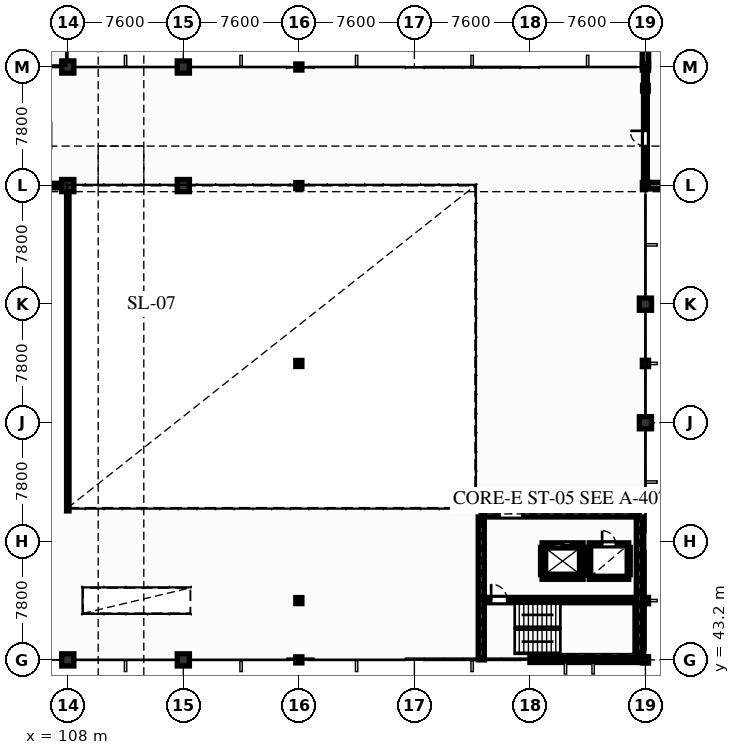
"""IFC4 building model, lengths in metres.
Left out: names, types, materials, properties, quantities, classifications, styles, units other than length and angle.
Written with IfcOpenShell. Run it as: python <this file> out.ifc"""

import sys

from ifc_helpers import new_model, si_unit, direction, frame, frame_2d, origin, origin_2d, place, context, subcontext, project, spatial, polyline, rectangle, i_section, outline, extrude, element, fill, save


model = new_model("IFC4")
c1 = context("Model", 3, precision=1e-05, world=origin(), true_north=direction((0.0, 1.0)))
c2 = subcontext(c1, "Body", "Model", "MODEL_VIEW")
j1 = project(units=[si_unit("LENGTHUNIT", "METRE"), si_unit("PLANEANGLEUNIT", "RADIAN")], contexts=[c1])
p1 = place(None, origin())
s1 = spatial("IfcSite", under=j1, at=p1, CompositionType="ELEMENT")
p2 = place(p1, origin())
s2 = spatial("IfcBuilding", under=s1, at=p2, CompositionType="ELEMENT")
p3 = place(p2, frame((0.0, 0.0, 8.94)))
s3 = spatial("IfcBuildingStorey", under=s2, at=p3, CompositionType="ELEMENT", Elevation=8.94)
for number, where, z_axis, x_axis in (
    (1, (108.0, 43.2, 0.0), (0.0, 0.0, 1.0), (1.0, 0.0, 0.0)),
    (2, (108.0, 74.4, 0.0), (0.0, 0.0, 1.0), (1.0, 0.0, 0.0)),
    (3, (108.0, 82.2, 0.0), (0.0, 0.0, 1.0), (1.0, 0.0, 0.0)),
    (4, (115.6, 43.2, 0.0), (0.0, 0.0, 1.0), (1.0, 0.0, 0.0)),
    (5, (115.6, 74.4, 0.0), (0.0, 0.0, 1.0), (1.0, 0.0, 0.0)),
    (6, (115.6, 82.2, 0.0), (0.0, 0.0, 1.0), (1.0, 0.0, 0.0)),
):
    element("IfcColumn", number, at=place(p3, frame(where, z_axis=z_axis, x_axis=x_axis)), inside=s3, PredefinedType="COLUMN", context=c2, shape_type="SweptSolid", body=[
        extrude(rectangle(XDim=0.8, YDim=0.8, at=origin_2d()), origin(), (0.0, 0.0, 1.0), 3.84),
    ])
for number, where, z_axis, x_axis in (
    (7, (123.2, 43.2, 0.0), (0.0, 0.0, 1.0), (1.0, 0.0, 0.0)),
    (8, (123.2, 74.4, 0.0), (0.0, 0.0, 1.0), (1.0, 0.0, 0.0)),
    (9, (123.2, 82.2, 0.0), (0.0, 0.0, 1.0), (1.0, 0.0, 0.0)),
):
    element("IfcColumn", number, at=place(p3, frame(where, z_axis=z_axis, x_axis=x_axis)), inside=s3, PredefinedType="COLUMN", context=c2, shape_type="SweptSolid", body=[
        extrude(i_section(OverallWidth=0.401, OverallDepth=0.399, WebThickness=0.025, FlangeThickness=0.04, at=origin_2d()), origin(), (0.0, 0.0, 1.0), 3.84),
    ])
for number, where, z_axis, x_axis in (
    (10, (146.0, 58.8, 0.0), (0.0, 0.0, 1.0), (1.0, 0.0, 0.0)),
    (11, (146.0, 66.6, 0.0), (0.0, 0.0, 1.0), (1.0, 0.0, 0.0)),
):
    element("IfcColumn", number, at=place(p3, frame(where, z_axis=z_axis, x_axis=x_axis)), inside=s3, PredefinedType="COLUMN", context=c2, shape_type="SweptSolid", body=[
        extrude(rectangle(XDim=0.8, YDim=0.8, at=origin_2d()), origin(), (0.0, 0.0, 1.0), 3.84),
    ])
for number, where, z_axis, x_axis in (
    (12, (146.0, 74.4, 0.0), (0.0, 0.0, 1.0), (1.0, 0.0, 0.0)),
    (13, (146.0, 82.2, 0.0), (0.0, 0.0, 1.0), (1.0, 0.0, 0.0)),
):
    element("IfcColumn", number, at=place(p3, frame(where, z_axis=z_axis, x_axis=x_axis)), inside=s3, PredefinedType="COLUMN", context=c2, shape_type="SweptSolid", body=[
        extrude(i_section(OverallWidth=0.406, OverallDepth=0.417, WebThickness=0.03, FlangeThickness=0.048, at=origin_2d()), origin(), (0.0, 0.0, 1.0), 3.84),
    ])
p4 = place(p3, frame((123.2, 47.1, 0.0), z_axis=(0.0, 0.0, 1.0), x_axis=(1.0, 0.0, 0.0)))
e14 = element("IfcColumn", 14, at=p4, inside=s3, PredefinedType="COLUMN", context=c2, shape_type="SweptSolid", body=[
    extrude(i_section(OverallWidth=0.401, OverallDepth=0.399, WebThickness=0.025, FlangeThickness=0.04, at=origin_2d()), origin(), (0.0, 0.0, 1.0), 3.84),
])
p5 = place(p3, frame((146.0, 47.1, 0.0), z_axis=(0.0, 0.0, 1.0), x_axis=(1.0, 0.0, 0.0)))
e15 = element("IfcColumn", 15, at=p5, inside=s3, PredefinedType="COLUMN", context=c2, shape_type="SweptSolid", body=[
    extrude(i_section(OverallWidth=0.406, OverallDepth=0.417, WebThickness=0.03, FlangeThickness=0.048, at=origin_2d()), origin(), (0.0, 0.0, 1.0), 3.84),
])
p6 = place(p3, frame((123.2, 62.7, 0.0), z_axis=(0.0, 0.0, 1.0), x_axis=(1.0, 0.0, 0.0)))
e16 = element("IfcColumn", 16, at=p6, inside=s3, PredefinedType="COLUMN", context=c2, shape_type="SweptSolid", body=[
    extrude(i_section(OverallWidth=0.401, OverallDepth=0.399, WebThickness=0.025, FlangeThickness=0.04, at=origin_2d()), origin(), (0.0, 0.0, 1.0), 3.84),
])
for number, where, z_axis, x_axis in (
    (17, (146.0, 62.7, 0.0), (0.0, 0.0, 1.0), (1.0, 0.0, 0.0)),
    (18, (146.0, 43.2, 0.0), (0.0, 0.0, 1.0), (1.0, 0.0, 0.0)),
):
    element("IfcColumn", number, at=place(p3, frame(where, z_axis=z_axis, x_axis=x_axis)), inside=s3, PredefinedType="COLUMN", context=c2, shape_type="SweptSolid", body=[
        extrude(i_section(OverallWidth=0.406, OverallDepth=0.417, WebThickness=0.03, FlangeThickness=0.048, at=origin_2d()), origin(), (0.0, 0.0, 1.0), 3.84),
    ])
p7 = place(p3, frame((146.0, 80.8, 0.0), z_axis=(0.0, 0.0, 1.0), x_axis=(1.0, 0.0, 0.0)))
e19 = element("IfcColumn", 19, at=p7, inside=s3, PredefinedType="COLUMN", context=c2, shape_type="SweptSolid", body=[
    extrude(i_section(OverallWidth=0.373, OverallDepth=0.368, WebThickness=0.015, FlangeThickness=0.024, at=origin_2d()), origin(), (0.0, 0.0, 1.0), 3.84),
])
p8 = place(p3, frame((90.0, 74.4, 0.0), z_axis=(0.0, 0.0, 1.0), x_axis=(1.0, 0.0, 0.0)))
e20 = element("IfcWall", 20, at=p8, inside=s3, PredefinedType="SOLIDWALL", context=c2, shape_type="SweptSolid", body=[
    extrude(rectangle(XDim=18.0, YDim=0.3, at=frame_2d((9.0, 0.0))), origin(), (0.0, 0.0, 1.0), 4.65),
])
p9 = place(p8, frame((3.0, 0.0, 3.23)))
e21 = element("IfcOpeningElement", 21, at=p9, cuts=e20, PredefinedType="OPENING", context=c2, shape_type="SweptSolid", body=[
    extrude(rectangle(XDim=2.6, YDim=1.3, at=frame_2d((1.3, 0.65))), frame((0.0, 0.16, 0.0), z_axis=(0.0, -1.0, 0.0), x_axis=(1.0, 0.0, 0.0)), (0.0, 0.0, 1.0), 0.32),
])
p10 = place(p8, frame((11.0, 0.0, 3.23)))
e22 = element("IfcOpeningElement", 22, at=p10, cuts=e20, PredefinedType="OPENING", context=c2, shape_type="SweptSolid", body=[
    extrude(rectangle(XDim=2.6, YDim=1.3, at=frame_2d((1.3, 0.65))), frame((0.0, 0.16, 0.0), z_axis=(0.0, -1.0, 0.0), x_axis=(1.0, 0.0, 0.0)), (0.0, 0.0, 1.0), 0.32),
])
p11 = place(p3, frame((138.4, 43.2, 0.0), z_axis=(0.0, 0.0, 1.0), x_axis=(1.0, 0.0, 0.0)))
e23 = element("IfcWall", 23, at=p11, inside=s3, PredefinedType="SOLIDWALL", context=c2, shape_type="SweptSolid", body=[
    extrude(rectangle(XDim=7.6, YDim=0.34, at=frame_2d((3.8, 0.0))), origin(), (0.0, 0.0, 1.0), 3.53),
])
p12 = place(p11, frame((2.5, 0.0, 0.9)))
e24 = element("IfcOpeningElement", 24, at=p12, cuts=e23, PredefinedType="OPENING", context=c2, shape_type="SweptSolid", body=[
    extrude(rectangle(XDim=1.5, YDim=2.1, at=frame_2d((0.75, 1.05))), frame((0.0, 0.18, 0.0), z_axis=(0.0, -1.0, 0.0), x_axis=(1.0, 0.0, 0.0)), (0.0, 0.0, 1.0), 0.36),
])
p13 = place(p3, frame((146.0, 74.4, 0.0), z_axis=(0.0, 0.0, 1.0), x_axis=(1.0, 0.0, 0.0)))
e25 = element("IfcWall", 25, at=p13, inside=s3, PredefinedType="SOLIDWALL", context=c2, shape_type="SweptSolid", body=[
    extrude(outline(polyline([(0.0, 0.0), (22.0, 0.0), (22.0, 3.94), (0.0, 9.24), (0.0, 0.0)])), frame((0.0, 0.21, 0.0), z_axis=(0.0, -1.0, 0.0), x_axis=(1.0, 0.0, 0.0)), (0.0, 0.0, 1.0), 0.42),
])
p14 = place(p13, frame((3.0, 0.0, 0.95)))
e26 = element("IfcOpeningElement", 26, at=p14, cuts=e25, PredefinedType="OPENING", context=c2, shape_type="SweptSolid", body=[
    extrude(rectangle(XDim=2.5, YDim=2.0, at=frame_2d((1.25, 1.0))), frame((0.0, 0.22, 0.0), z_axis=(0.0, -1.0, 0.0), x_axis=(1.0, 0.0, 0.0)), (0.0, 0.0, 1.0), 0.44),
])
p15 = place(p13, frame((10.5, 0.0, 0.95)))
e27 = element("IfcOpeningElement", 27, at=p15, cuts=e25, PredefinedType="OPENING", context=c2, shape_type="SweptSolid", body=[
    extrude(rectangle(XDim=2.05, YDim=1.85, at=frame_2d((1.025, 0.925))), frame((0.0, 0.22, 0.0), z_axis=(0.0, -1.0, 0.0), x_axis=(1.0, 0.0, 0.0)), (0.0, 0.0, 1.0), 0.44),
])
p16 = place(p3, frame((146.0, 82.2, 0.0), z_axis=(0.0, 0.0, 1.0), x_axis=(0.0, 1.0, 0.0)))
e28 = element("IfcWall", 28, at=p16, inside=s3, PredefinedType="SOLIDWALL", context=c2, shape_type="SweptSolid", body=[
    extrude(rectangle(XDim=23.8, YDim=0.42, at=frame_2d((11.9, 0.0))), origin(), (0.0, 0.0, 1.0), 9.24),
])
p17 = place(p3, frame((135.2, 52.8, 0.0), z_axis=(0.0, 0.0, 1.0), x_axis=(1.0, 0.0, 0.0)))
e29 = element("IfcWall", 29, at=p17, inside=s3, PredefinedType="SHEAR", context=c2, shape_type="SweptSolid", body=[
    extrude(rectangle(XDim=10.4, YDim=0.4, at=frame_2d((5.2, 0.0))), origin(), (0.0, 0.0, 1.0), 3.53),
])
p18 = place(p17, frame((1.2, 0.0, 0.0)))
e30 = element("IfcOpeningElement", 30, at=p18, cuts=e29, PredefinedType="OPENING", context=c2, shape_type="SweptSolid", body=[
    extrude(rectangle(XDim=1.5, YDim=2.2, at=frame_2d((0.75, 1.1))), frame((0.0, 0.21, 0.0), z_axis=(0.0, -1.0, 0.0), x_axis=(1.0, 0.0, 0.0)), (0.0, 0.0, 1.0), 0.42),
])
for number, where, z_axis, x_axis in (
    (31, (135.2, 43.2, 0.0), (0.0, 0.0, 1.0), (0.0, 1.0, 0.0)),
    (32, (145.6, 43.2, 0.0), (0.0, 0.0, 1.0), (0.0, 1.0, 0.0)),
):
    element("IfcWall", number, at=place(p3, frame(where, z_axis=z_axis, x_axis=x_axis)), inside=s3, PredefinedType="SHEAR", context=c2, shape_type="SweptSolid", body=[
        extrude(rectangle(XDim=9.4, YDim=0.4, at=frame_2d((4.7, 0.0))), origin(), (0.0, 0.0, 1.0), 3.53),
    ])
p19 = place(p3, frame((135.4, 47.135, 0.0), z_axis=(0.0, 0.0, 1.0), x_axis=(1.0, 0.0, 0.0)))
e33 = element("IfcWall", 33, at=p19, inside=s3, PredefinedType="SHEAR", context=c2, shape_type="SweptSolid", body=[
    extrude(rectangle(XDim=10.0, YDim=0.35, at=frame_2d((5.0, 0.0))), origin(), (0.0, 0.0, 1.0), 3.53),
])
p20 = place(p19, frame((0.45, 0.0, 0.0)))
e34 = element("IfcOpeningElement", 34, at=p20, cuts=e33, PredefinedType="OPENING", context=c2, shape_type="SweptSolid", body=[
    extrude(rectangle(XDim=1.05, YDim=2.2, at=frame_2d((0.525, 1.1))), frame((0.0, 0.185, 0.0), z_axis=(0.0, -1.0, 0.0), x_axis=(1.0, 0.0, 0.0)), (0.0, 0.0, 1.0), 0.37),
])
p21 = place(p3, frame((139.2, 48.6, 0.0), z_axis=(0.0, 0.0, 1.0), x_axis=(1.0, 0.0, 0.0)))
e35 = element("IfcWall", 35, at=p21, inside=s3, PredefinedType="PARTITIONING", context=c2, shape_type="SweptSolid", body=[
    extrude(rectangle(XDim=2.7, YDim=0.2, at=frame_2d((1.35, 0.0))), origin(), (0.0, 0.0, 1.0), 3.53),
])
p22 = place(p3, frame((139.2, 50.8, 0.0), z_axis=(0.0, 0.0, 1.0), x_axis=(1.0, 0.0, 0.0)))
e36 = element("IfcWall", 36, at=p22, inside=s3, PredefinedType="PARTITIONING", context=c2, shape_type="SweptSolid", body=[
    extrude(rectangle(XDim=2.7, YDim=0.2, at=frame_2d((1.35, 0.0))), origin(), (0.0, 0.0, 1.0), 3.53),
])
p23 = place(p22, frame((0.8, 0.0, 0.0)))
e37 = element("IfcOpeningElement", 37, at=p23, cuts=e36, PredefinedType="OPENING", context=c2, shape_type="SweptSolid", body=[
    extrude(rectangle(XDim=1.1, YDim=2.15, at=frame_2d((0.55, 1.075))), frame((0.0, 0.11, 0.0), z_axis=(0.0, -1.0, 0.0), x_axis=(1.0, 0.0, 0.0)), (0.0, 0.0, 1.0), 0.22),
])
for number, where, z_axis, x_axis in (
    (38, (139.2, 48.8, 0.0), (0.0, 0.0, 1.0), (0.0, 1.0, 0.0)),
    (39, (141.9, 48.8, 0.0), (0.0, 0.0, 1.0), (0.0, 1.0, 0.0)),
):
    element("IfcWall", number, at=place(p3, frame(where, z_axis=z_axis, x_axis=x_axis)), inside=s3, PredefinedType="PARTITIONING", context=c2, shape_type="SweptSolid", body=[
        extrude(rectangle(XDim=1.8, YDim=0.2, at=frame_2d((0.9, 0.0))), origin(), (0.0, 0.0, 1.0), 3.53),
    ])
p24 = place(p3, frame((142.3, 48.6, 0.0), z_axis=(0.0, 0.0, 1.0), x_axis=(1.0, 0.0, 0.0)))
e40 = element("IfcWall", 40, at=p24, inside=s3, PredefinedType="PARTITIONING", context=c2, shape_type="SweptSolid", body=[
    extrude(rectangle(XDim=2.6, YDim=0.2, at=frame_2d((1.3, 0.0))), origin(), (0.0, 0.0, 1.0), 3.53),
])
p25 = place(p3, frame((142.3, 50.8, 0.0), z_axis=(0.0, 0.0, 1.0), x_axis=(1.0, 0.0, 0.0)))
e41 = element("IfcWall", 41, at=p25, inside=s3, PredefinedType="PARTITIONING", context=c2, shape_type="SweptSolid", body=[
    extrude(rectangle(XDim=2.6, YDim=0.2, at=frame_2d((1.3, 0.0))), origin(), (0.0, 0.0, 1.0), 3.53),
])
p26 = place(p25, frame((0.85, 0.0, 0.0)))
e42 = element("IfcOpeningElement", 42, at=p26, cuts=e41, PredefinedType="OPENING", context=c2, shape_type="SweptSolid", body=[
    extrude(rectangle(XDim=0.9, YDim=2.1, at=frame_2d((0.45, 1.05))), frame((0.0, 0.11, 0.0), z_axis=(0.0, -1.0, 0.0), x_axis=(1.0, 0.0, 0.0)), (0.0, 0.0, 1.0), 0.22),
])
for number, where, z_axis, x_axis in (
    (43, (142.3, 48.8, 0.0), (0.0, 0.0, 1.0), (0.0, 1.0, 0.0)),
    (44, (144.9, 48.8, 0.0), (0.0, 0.0, 1.0), (0.0, 1.0, 0.0)),
):
    element("IfcWall", number, at=place(p3, frame(where, z_axis=z_axis, x_axis=x_axis)), inside=s3, PredefinedType="PARTITIONING", context=c2, shape_type="SweptSolid", body=[
        extrude(rectangle(XDim=1.8, YDim=0.2, at=frame_2d((0.9, 0.0))), origin(), (0.0, 0.0, 1.0), 3.53),
    ])
p27 = place(p3, frame((146.0, 74.4, 0.0), z_axis=(0.0, 0.0, 1.0), x_axis=(0.0, 1.0, 0.0)))
e45 = element("IfcWall", 45, at=p27, inside=s3, PredefinedType="PARTITIONING", context=c2, shape_type="SweptSolid", body=[
    extrude(rectangle(XDim=7.8, YDim=0.25, at=frame_2d((3.9, 0.0))), origin(), (0.0, 0.0, 1.0), 3.058),
])
p28 = place(p27, frame((2.6, 0.0, 0.0)))
e46 = element("IfcOpeningElement", 46, at=p28, cuts=e45, PredefinedType="OPENING", context=c2, shape_type="SweptSolid", body=[
    extrude(rectangle(XDim=1.0, YDim=2.15, at=frame_2d((0.5, 1.075))), frame((0.0, 0.135, 0.0), z_axis=(0.0, -1.0, 0.0), x_axis=(1.0, 0.0, 0.0)), (0.0, 0.0, 1.0), 0.27),
])
p29 = place(p3, frame((108.0, 53.0, 0.0), z_axis=(0.0, 0.0, 1.0), x_axis=(0.0, 1.0, 0.0)))
e47 = element("IfcWall", 47, at=p29, inside=s3, PredefinedType="PARTITIONING", context=c2, shape_type="SweptSolid", body=[
    extrude(rectangle(XDim=21.4, YDim=0.16, at=frame_2d((10.7, 0.0))), origin(), (0.0, 0.0, 1.0), 3.53),
])
p30 = place(p12, origin())
e48 = element("IfcWindow", 48, at=p30, inside=s3, PartitioningType="SINGLE_PANEL", PredefinedType="WINDOW", context=c2, shape_type="SweptSolid", body=[
    extrude(rectangle(XDim=1.5, YDim=2.1, at=frame_2d((0.75, 1.05))), frame((0.0, 0.03, 0.0), z_axis=(0.0, -1.0, 0.0), x_axis=(1.0, 0.0, 0.0)), (0.0, 0.0, 1.0), 0.06),
])
fill(e24, e48)
p31 = place(p18, origin())
e49 = element("IfcDoor", 49, at=p31, inside=s3, OperationType="DOUBLE_DOOR_SINGLE_SWING", PredefinedType="DOOR", context=c2, shape_type="SweptSolid", body=[
    extrude(rectangle(XDim=1.5, YDim=2.2, at=frame_2d((0.75, 1.1))), frame((0.0, 0.025, 0.0), z_axis=(0.0, -1.0, 0.0), x_axis=(1.0, 0.0, 0.0)), (0.0, 0.0, 1.0), 0.05),
])
fill(e30, e49)
p32 = place(p20, origin())
e50 = element("IfcDoor", 50, at=p32, inside=s3, OperationType="SINGLE_SWING_LEFT", PredefinedType="DOOR", context=c2, shape_type="SweptSolid", body=[
    extrude(rectangle(XDim=1.05, YDim=2.2, at=frame_2d((0.525, 1.1))), frame((0.0, 0.025, 0.0), z_axis=(0.0, -1.0, 0.0), x_axis=(1.0, 0.0, 0.0)), (0.0, 0.0, 1.0), 0.05),
])
fill(e34, e50)
p33 = place(p23, origin())
e51 = element("IfcDoor", 51, at=p33, inside=s3, OperationType="SLIDING_TO_LEFT", PredefinedType="DOOR", context=c2, shape_type="SweptSolid", body=[
    extrude(rectangle(XDim=1.1, YDim=2.15, at=frame_2d((0.55, 1.075))), frame((0.0, 0.025, 0.0), z_axis=(0.0, -1.0, 0.0), x_axis=(1.0, 0.0, 0.0)), (0.0, 0.0, 1.0), 0.05),
])
fill(e37, e51)
p34 = place(p26, origin())
e52 = element("IfcDoor", 52, at=p34, inside=s3, OperationType="SINGLE_SWING_LEFT", PredefinedType="DOOR", context=c2, shape_type="SweptSolid", body=[
    extrude(rectangle(XDim=0.9, YDim=2.1, at=frame_2d((0.45, 1.05))), frame((0.0, 0.025, 0.0), z_axis=(0.0, -1.0, 0.0), x_axis=(1.0, 0.0, 0.0)), (0.0, 0.0, 1.0), 0.05),
])
fill(e42, e52)
p35 = place(p28, origin())
e53 = element("IfcDoor", 53, at=p35, inside=s3, OperationType="SINGLE_SWING_RIGHT", PredefinedType="DOOR", context=c2, shape_type="SweptSolid", body=[
    extrude(rectangle(XDim=1.0, YDim=2.15, at=frame_2d((0.5, 1.075))), frame((0.0, 0.025, 0.0), z_axis=(0.0, -1.0, 0.0), x_axis=(1.0, 0.0, 0.0)), (0.0, 0.0, 1.0), 0.05),
])
fill(e46, e53)
save(model, sys.argv[1])
